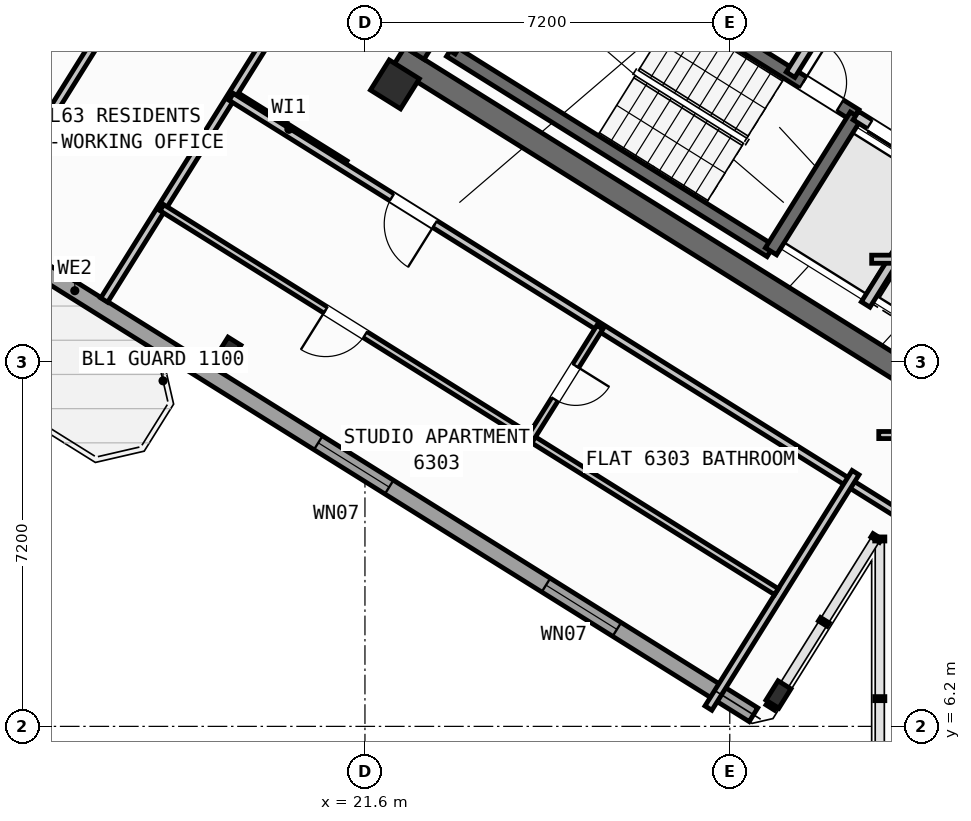
"""IFC4 building model, lengths in metres.
Left out: names, types, materials, properties, quantities, classifications, styles, units other than length and angle.
Written with IfcOpenShell. Run it as: python <this file> out.ifc"""

import sys

from ifc_helpers import new_model, si_unit, direction, frame, frame_2d, origin, origin_2d, place, context, subcontext, project, spatial, rectangle, hollow_rectangle, i_section, extrude, source, transform, mapped, element, fill, save


model = new_model("IFC4")
c1 = context("Model", 3, precision=1e-05, world=origin(), true_north=direction((0.0, 1.0)))
c2 = subcontext(c1, "Body", "Model", "MODEL_VIEW")
j1 = project(units=[si_unit("LENGTHUNIT", "METRE"), si_unit("PLANEANGLEUNIT", "RADIAN")], contexts=[c1])
p1 = place(None, origin())
s1 = spatial("IfcSite", under=j1, at=p1, CompositionType="ELEMENT")
p2 = place(p1, origin())
s2 = spatial("IfcBuilding", under=s1, at=p2, CompositionType="ELEMENT")
p3 = place(p2, frame((0.0, 0.0, 251.1)))
s3 = spatial("IfcBuildingStorey", under=s2, at=p3, CompositionType="ELEMENT", Elevation=251.1)
p4 = place(p3, frame((33.324, 12.503, 0.0), z_axis=(0.0, 0.0, 1.0), x_axis=(-0.848043529849, 0.529926571782, 0.0)))
e1 = element("IfcWall", 1, at=p4, inside=s3, PredefinedType="SHEAR", context=c2, shape_type="SweptSolid", body=[
    extrude(rectangle(XDim=13.04, YDim=0.45, at=frame_2d((6.52, 0.0))), origin(), (0.0, 0.0, 1.0), 3.32),
])
p5 = place(p3, frame((26.007, 24.976, 0.0), z_axis=(0.0, 0.0, 1.0), x_axis=(-0.529931155655, -0.848040665456, 0.0)))
e2 = element("IfcWall", 2, at=p5, inside=s3, PredefinedType="SHEAR", context=c2, shape_type="SweptSolid", body=[
    extrude(rectangle(XDim=6.475, YDim=0.45, at=frame_2d((3.238, 0.0))), origin(), (0.0, 0.0, 1.0), 3.32),
])
m1 = source(origin(), c2, "Body", "SweptSolid", [
    extrude(i_section(OverallWidth=0.3, OverallDepth=0.45, WebThickness=0.014, FlangeThickness=0.026, at=origin_2d()), origin(), (0.0, 0.0, 1.0), 3.6),
])
p6 = place(p3, frame((29.761, 6.829, 0.0), z_axis=(0.0, 0.0, 1.0), x_axis=(-0.848048096156, 0.529919264233, 0.0)))
e3 = element("IfcColumn", 3, at=p6, inside=s3, PredefinedType="COLUMN", context=c2, shape_type="MappedRepresentation", body=[
    mapped(m1, transform((0.0, 0.0, 0.0), scale=1.0)),
])
m2 = source(origin(), c2, "Body", "SweptSolid", [
    extrude(hollow_rectangle(XDim=0.7, YDim=0.7, WallThickness=0.028, at=origin_2d()), origin(), (0.0, 0.0, 1.0), 3.6),
])
p7 = place(p3, frame((22.191, 18.87, 0.0), z_axis=(0.0, 0.0, 1.0), x_axis=(-0.848048096156, 0.529919264233, 0.0)))
e4 = element("IfcColumn", 4, at=p7, inside=s3, PredefinedType="COLUMN", context=c2, shape_type="MappedRepresentation", body=[
    mapped(m2, transform((0.0, 0.0, 0.0), scale=1.0)),
])
p8 = place(p3, frame((18.906, 13.612, 0.0), z_axis=(0.0, 0.0, 1.0), x_axis=(-0.848048096156, 0.529919264233, 0.0)))
e5 = element("IfcColumn", 5, at=p8, inside=s3, PredefinedType="COLUMN", context=c2, shape_type="MappedRepresentation", body=[
    mapped(m1, transform((0.0, 0.0, 0.0), scale=1.0)),
])
p9 = place(p3, frame((29.268, 6.429, 0.0), z_axis=(0.0, 0.0, 1.0), x_axis=(-0.848049971435, 0.529916263149, 0.0)))
e6 = element("IfcWall", 6, at=p9, inside=s3, PredefinedType="STANDARD", context=c2, shape_type="SweptSolid", body=[
    extrude(rectangle(XDim=31.588, YDim=0.32, at=frame_2d((15.794, 0.0))), origin(), (0.0, 0.0, 1.0), 3.32),
])
p10 = place(p9, frame((22.848, 0.0, 0.0)))
e7 = element("IfcOpeningElement", 7, at=p10, cuts=e6, PredefinedType="OPENING", context=c2, shape_type="SweptSolid", body=[
    extrude(rectangle(XDim=1.2, YDim=2.15, at=frame_2d((0.6, 1.075))), frame((0.0, 0.17, 0.0), z_axis=(0.0, -1.0, 0.0), x_axis=(1.0, 0.0, 0.0)), (0.0, 0.0, 1.0), 0.34),
])
p11 = place(p9, frame((3.178, 0.0, 0.9)))
e8 = element("IfcOpeningElement", 8, at=p11, cuts=e6, PredefinedType="OPENING", context=c2, shape_type="SweptSolid", body=[
    extrude(rectangle(XDim=1.65, YDim=1.45, at=frame_2d((0.825, 0.725))), frame((0.0, 0.17, 0.0), z_axis=(0.0, -1.0, 0.0), x_axis=(1.0, 0.0, 0.0)), (0.0, 0.0, 1.0), 0.34),
])
p12 = place(p9, frame((8.478, 0.0, 0.9)))
e9 = element("IfcOpeningElement", 9, at=p12, cuts=e6, PredefinedType="OPENING", context=c2, shape_type="SweptSolid", body=[
    extrude(rectangle(XDim=1.65, YDim=1.45, at=frame_2d((0.825, 0.725))), frame((0.0, 0.17, 0.0), z_axis=(0.0, -1.0, 0.0), x_axis=(1.0, 0.0, 0.0)), (0.0, 0.0, 1.0), 0.34),
])
p13 = place(p3, frame((29.605, 15.581, 0.0), z_axis=(0.0, 0.0, 1.0), x_axis=(-0.848036911448, 0.529937163087, 0.0)))
e10 = element("IfcWall", 10, at=p13, inside=s3, PredefinedType="SHEAR", context=c2, shape_type="SweptSolid", body=[
    extrude(rectangle(XDim=7.46, YDim=0.26, at=frame_2d((3.73, 0.0))), origin(), (0.0, 0.0, 1.0), 3.32),
])
p14 = place(p3, frame((31.28, 18.261, 0.0), z_axis=(0.0, 0.0, 1.0), x_axis=(-0.848051618787, 0.529913626805, 0.0)))
e11 = element("IfcWall", 11, at=p14, inside=s3, PredefinedType="SHEAR", context=c2, shape_type="SweptSolid", body=[
    extrude(rectangle(XDim=7.46, YDim=0.26, at=frame_2d((3.73, 0.0))), origin(), (0.0, 0.0, 1.0), 3.32),
])
p15 = place(p14, frame((0.36, 0.0, 0.0)))
e12 = element("IfcOpeningElement", 12, at=p15, cuts=e11, PredefinedType="OPENING", context=c2, shape_type="SweptSolid", body=[
    extrude(rectangle(XDim=0.86, YDim=2.05, at=frame_2d((0.43, 1.025))), frame((0.0, 0.14, 0.0), z_axis=(0.0, -1.0, 0.0), x_axis=(1.0, 0.0, 0.0)), (0.0, 0.0, 1.0), 0.28),
])
p16 = place(p3, frame((31.288, 18.256, 0.0), z_axis=(0.0, 0.0, 1.0), x_axis=(-0.529943379326, -0.848033026897, 0.0)))
e13 = element("IfcWall", 13, at=p16, inside=s3, PredefinedType="SHEAR", context=c2, shape_type="SweptSolid", body=[
    extrude(rectangle(XDim=3.16, YDim=0.26, at=frame_2d((1.58, 0.0))), origin(), (0.0, 0.0, 1.0), 3.32),
])
p17 = place(p3, frame((24.945, 22.22, 0.0), z_axis=(0.0, 0.0, 1.0), x_axis=(-0.529908658664, -0.84805472316, 0.0)))
e14 = element("IfcWall", 14, at=p17, inside=s3, PredefinedType="SHEAR", context=c2, shape_type="SweptSolid", body=[
    extrude(rectangle(XDim=3.16, YDim=0.26, at=frame_2d((1.58, 0.0))), origin(), (0.0, 0.0, 1.0), 3.32),
])
p18 = place(p3, frame((34.933, 15.978, 0.0), z_axis=(0.0, 0.0, 1.0), x_axis=(-0.848055739377, 0.529907032327, 0.0)))
e15 = element("IfcWall", 15, at=p18, inside=s3, PredefinedType="STANDARD", context=c2, shape_type="SweptSolid", body=[
    extrude(rectangle(XDim=4.298, YDim=0.2, at=frame_2d((2.149, 0.0))), origin(), (0.0, 0.0, 1.0), 3.31),
])
p19 = place(p18, frame((0.448, 0.0, 0.0)))
e16 = element("IfcOpeningElement", 16, at=p19, cuts=e15, PredefinedType="OPENING", context=c2, shape_type="SweptSolid", body=[
    extrude(rectangle(XDim=1.3, YDim=2.2, at=frame_2d((0.65, 1.1))), frame((0.0, 0.11, 0.0), z_axis=(0.0, -1.0, 0.0), x_axis=(1.0, 0.0, 0.0)), (0.0, 0.0, 1.0), 0.22),
])
p20 = place(p18, frame((2.523, 0.0, 0.0)))
e17 = element("IfcOpeningElement", 17, at=p20, cuts=e15, PredefinedType="OPENING", context=c2, shape_type="SweptSolid", body=[
    extrude(rectangle(XDim=1.45, YDim=2.25, at=frame_2d((0.725, 1.125))), frame((0.0, 0.11, 0.0), z_axis=(0.0, -1.0, 0.0), x_axis=(1.0, 0.0, 0.0)), (0.0, 0.0, 1.0), 0.22),
])
p21 = place(p3, frame((36.459, 18.421, 0.0), z_axis=(0.0, 0.0, 1.0), x_axis=(-0.848059591691, 0.529900867089, 0.0)))
e18 = element("IfcWall", 18, at=p21, inside=s3, PredefinedType="STANDARD", context=c2, shape_type="SweptSolid", body=[
    extrude(rectangle(XDim=5.818, YDim=0.2, at=frame_2d((2.909, 0.0))), origin(), (0.0, 0.0, 1.0), 3.31),
])
p22 = place(p21, frame((2.598, 0.0, 0.0)))
e19 = element("IfcOpeningElement", 19, at=p22, cuts=e18, PredefinedType="OPENING", context=c2, shape_type="SweptSolid", body=[
    extrude(rectangle(XDim=1.15, YDim=2.1, at=frame_2d((0.575, 1.05))), frame((0.0, 0.11, 0.0), z_axis=(0.0, -1.0, 0.0), x_axis=(1.0, 0.0, 0.0)), (0.0, 0.0, 1.0), 0.22),
])
p23 = place(p3, frame((33.029, 17.003, 0.0), z_axis=(0.0, 0.0, 1.0), x_axis=(-0.529916267533, -0.848049968695, 0.0)))
e20 = element("IfcWall", 20, at=p23, inside=s3, PredefinedType="STANDARD", context=c2, shape_type="SweptSolid", body=[
    extrude(rectangle(XDim=2.92, YDim=0.2, at=frame_2d((1.46, 0.0))), origin(), (0.0, 0.0, 1.0), 3.31),
])
p24 = place(p3, frame((31.525, 21.504, 0.0), z_axis=(0.0, 0.0, 1.0), x_axis=(-0.529907497854, -0.848055448493, 0.0)))
e21 = element("IfcWall", 21, at=p24, inside=s3, PredefinedType="STANDARD", context=c2, shape_type="SweptSolid", body=[
    extrude(rectangle(XDim=2.88, YDim=0.2, at=frame_2d((1.44, 0.0))), origin(), (0.0, 0.0, 1.0), 3.31),
])
p25 = place(p3, frame((21.206, 17.292, 0.0), z_axis=(0.0, 0.0, 1.0), x_axis=(-0.848050851465, 0.529914854792, 0.0)))
e22 = element("IfcWall", 22, at=p25, inside=s3, PredefinedType="PARTITIONING", context=c2, shape_type="SweptSolid", body=[
    extrude(rectangle(XDim=2.61, YDim=0.16, at=frame_2d((1.305, 0.0))), origin(), (0.0, 0.0, 1.0), 3.31),
])
p26 = place(p3, frame((21.938, 23.391, 0.0), z_axis=(0.0, 0.0, 1.0), x_axis=(-0.529924725692, -0.848044683434, 0.0)))
e23 = element("IfcWall", 23, at=p26, inside=s3, PredefinedType="PARTITIONING", context=c2, shape_type="SweptSolid", body=[
    extrude(rectangle(XDim=10.35, YDim=0.16, at=frame_2d((5.175, 0.0))), origin(), (0.0, 0.0, 1.0), 3.31),
])
p27 = place(p3, frame((19.529, 24.896, 0.0), z_axis=(0.0, 0.0, 1.0), x_axis=(-0.529914125013, -0.848051307476, 0.0)))
e24 = element("IfcWall", 24, at=p27, inside=s3, PredefinedType="PARTITIONING", context=c2, shape_type="SweptSolid", body=[
    extrude(rectangle(XDim=10.35, YDim=0.16, at=frame_2d((5.175, 0.0))), origin(), (0.0, 0.0, 1.0), 3.31),
])
p28 = place(p3, frame((16.837, 26.579, 0.0), z_axis=(0.0, 0.0, 1.0), x_axis=(-0.529941690036, -0.848034082547, 0.0)))
e25 = element("IfcWall", 25, at=p28, inside=s3, PredefinedType="PARTITIONING", context=c2, shape_type="SweptSolid", body=[
    extrude(rectangle(XDim=10.35, YDim=0.16, at=frame_2d((5.175, 0.0))), origin(), (0.0, 0.0, 1.0), 2.935),
])
p29 = place(p3, frame((32.164, 10.374, 0.0), z_axis=(0.0, 0.0, 1.0), x_axis=(-0.848044107957, 0.529925646633, 0.0)))
e26 = element("IfcWall", 26, at=p29, inside=s3, PredefinedType="PARTITIONING", context=c2, shape_type="SweptSolid", body=[
    extrude(rectangle(XDim=15.57, YDim=0.16, at=frame_2d((7.785, 0.0))), origin(), (0.0, 0.0, 1.0), 3.31),
])
p30 = place(p29, frame((10.83, 0.0, 0.0)))
e27 = element("IfcOpeningElement", 27, at=p30, cuts=e26, PredefinedType="OPENING", context=c2, shape_type="SweptSolid", body=[
    extrude(rectangle(XDim=1.0, YDim=2.1, at=frame_2d((0.5, 1.05))), frame((0.0, 0.09, 0.0), z_axis=(0.0, -1.0, 0.0), x_axis=(1.0, 0.0, 0.0)), (0.0, 0.0, 1.0), 0.18),
])
p31 = place(p3, frame((31.282, 11.208, 0.0), z_axis=(0.0, 0.0, 1.0), x_axis=(-0.529938869374, -0.84803584519, 0.0)))
e28 = element("IfcWall", 28, at=p31, inside=s3, PredefinedType="PARTITIONING", context=c2, shape_type="SweptSolid", body=[
    extrude(rectangle(XDim=5.48, YDim=0.16, at=frame_2d((2.74, 0.0))), origin(), (0.0, 0.0, 1.0), 3.31),
])
p32 = place(p3, frame((29.72, 8.859, 0.0), z_axis=(0.0, 0.0, 1.0), x_axis=(-0.848049134363, 0.529917602752, 0.0)))
e29 = element("IfcWall", 29, at=p32, inside=s3, PredefinedType="PLUMBINGWALL", context=c2, shape_type="SweptSolid", body=[
    extrude(rectangle(XDim=14.3, YDim=0.14, at=frame_2d((7.15, 0.0))), origin(), (0.0, 0.0, 1.0), 3.31),
])
p33 = place(p32, frame((9.57, 0.0, 0.0)))
e30 = element("IfcOpeningElement", 30, at=p33, cuts=e29, PredefinedType="OPENING", context=c2, shape_type="SweptSolid", body=[
    extrude(rectangle(XDim=0.92, YDim=2.08, at=frame_2d((0.46, 1.04))), frame((0.0, 0.08, 0.0), z_axis=(0.0, -1.0, 0.0), x_axis=(1.0, 0.0, 0.0)), (0.0, 0.0, 1.0), 0.16),
])
p34 = place(p3, frame((26.237, 14.078, 0.0), z_axis=(0.0, 0.0, 1.0), x_axis=(-0.52995640672, -0.848024885824, 0.0)))
e31 = element("IfcWall", 31, at=p34, inside=s3, PredefinedType="PLUMBINGWALL", context=c2, shape_type="SweptSolid", body=[
    extrude(rectangle(XDim=2.58, YDim=0.14, at=frame_2d((1.29, 0.0))), origin(), (0.0, 0.0, 1.0), 3.31),
])
p35 = place(p34, frame((0.9, 0.0, 0.0)))
e32 = element("IfcOpeningElement", 32, at=p35, cuts=e31, PredefinedType="OPENING", context=c2, shape_type="SweptSolid", body=[
    extrude(rectangle(XDim=0.78, YDim=2.05, at=frame_2d((0.39, 1.025))), frame((0.0, 0.08, 0.0), z_axis=(0.0, -1.0, 0.0), x_axis=(1.0, 0.0, 0.0)), (0.0, 0.0, 1.0), 0.16),
])
p36 = place(p3, frame((31.6, 15.42, 0.0), z_axis=(0.0, 0.0, 1.0), x_axis=(1.0, 0.0, 0.0)))
e33 = element("IfcWall", 33, at=p36, inside=s3, PredefinedType="PARTITIONING", context=c2, shape_type="SweptSolid", body=[
    extrude(rectangle(XDim=2.984, YDim=0.16, at=frame_2d((1.492, 0.0))), origin(), (0.0, 0.0, 1.0), 3.31),
])
p37 = place(p3, frame((31.74, 11.95, 0.0), z_axis=(0.0, 0.0, 1.0), x_axis=(1.0, 0.0, 0.0)))
e34 = element("IfcWall", 34, at=p37, inside=s3, PredefinedType="PLUMBINGWALL", context=c2, shape_type="SweptSolid", body=[
    extrude(rectangle(XDim=0.842, YDim=0.14, at=frame_2d((0.421, 0.0))), origin(), (0.0, 0.0, 1.0), 3.31),
])
m3 = source(origin(), c2, "Body", "SweptSolid", [
    extrude(rectangle(XDim=1.65, YDim=1.45, at=frame_2d((0.825, 0.725))), frame((0.0, 0.03, 0.0), z_axis=(0.0, -1.0, 0.0), x_axis=(1.0, 0.0, 0.0)), (0.0, 0.0, 1.0), 0.06),
])
p38 = place(p11, origin())
e35 = element("IfcWindow", 35, at=p38, inside=s3, PartitioningType="SINGLE_PANEL", PredefinedType="WINDOW", context=c2, shape_type="MappedRepresentation", body=[
    mapped(m3, transform((0.0, 0.0, 0.0), scale=1.0)),
])
fill(e8, e35)
p39 = place(p12, origin())
e36 = element("IfcWindow", 36, at=p39, inside=s3, PartitioningType="SINGLE_PANEL", PredefinedType="WINDOW", context=c2, shape_type="MappedRepresentation", body=[
    mapped(m3, transform((0.0, 0.0, 0.0), scale=1.0)),
])
fill(e9, e36)
m4 = source(origin(), c2, "Body", "SweptSolid", [
    extrude(rectangle(XDim=0.86, YDim=2.05, at=frame_2d((0.43, 1.025))), frame((0.0, 0.025, 0.0), z_axis=(0.0, -1.0, 0.0), x_axis=(1.0, 0.0, 0.0)), (0.0, 0.0, 1.0), 0.05),
])
p40 = place(p15, frame((0.86, 0.0, 0.0), z_axis=(0.0, 0.0, 1.0), x_axis=(-1.0, 0.0, 0.0)))
e37 = element("IfcDoor", 37, at=p40, inside=s3, OperationType="SINGLE_SWING_LEFT", PredefinedType="DOOR", context=c2, shape_type="MappedRepresentation", body=[
    mapped(m4, transform((0.0, 0.0, 0.0), scale=1.0)),
])
fill(e12, e37)
m5 = source(origin(), c2, "Body", "SweptSolid", [
    extrude(rectangle(XDim=1.45, YDim=2.25, at=frame_2d((0.725, 1.125))), frame((0.0, 0.025, 0.0), z_axis=(0.0, -1.0, 0.0), x_axis=(1.0, 0.0, 0.0)), (0.0, 0.0, 1.0), 0.05),
])
p41 = place(p20, origin())
e38 = element("IfcDoor", 38, at=p41, inside=s3, OperationType="DOUBLE_DOOR_SLIDING", PredefinedType="DOOR", context=c2, shape_type="MappedRepresentation", body=[
    mapped(m5, transform((0.0, 0.0, 0.0), scale=1.0)),
])
fill(e17, e38)
m6 = source(origin(), c2, "Body", "SweptSolid", [
    extrude(rectangle(XDim=1.0, YDim=2.1, at=frame_2d((0.5, 1.05))), frame((0.0, 0.025, 0.0), z_axis=(0.0, -1.0, 0.0), x_axis=(1.0, 0.0, 0.0)), (0.0, 0.0, 1.0), 0.05),
])
p42 = place(p30, origin())
e39 = element("IfcDoor", 39, at=p42, inside=s3, OperationType="SINGLE_SWING_LEFT", PredefinedType="DOOR", context=c2, shape_type="MappedRepresentation", body=[
    mapped(m6, transform((0.0, 0.0, 0.0), scale=1.0)),
])
fill(e27, e39)
m7 = source(origin(), c2, "Body", "SweptSolid", [
    extrude(rectangle(XDim=0.92, YDim=2.08, at=frame_2d((0.46, 1.04))), frame((0.0, 0.025, 0.0), z_axis=(0.0, -1.0, 0.0), x_axis=(1.0, 0.0, 0.0)), (0.0, 0.0, 1.0), 0.05),
])
p43 = place(p33, origin())
e40 = element("IfcDoor", 40, at=p43, inside=s3, OperationType="SINGLE_SWING_RIGHT", PredefinedType="DOOR", context=c2, shape_type="MappedRepresentation", body=[
    mapped(m7, transform((0.0, 0.0, 0.0), scale=1.0)),
])
fill(e30, e40)
m8 = source(origin(), c2, "Body", "SweptSolid", [
    extrude(rectangle(XDim=0.78, YDim=2.05, at=frame_2d((0.39, 1.025))), frame((0.0, 0.025, 0.0), z_axis=(0.0, -1.0, 0.0), x_axis=(1.0, 0.0, 0.0)), (0.0, 0.0, 1.0), 0.05),
])
p44 = place(p35, origin())
e41 = element("IfcDoor", 41, at=p44, inside=s3, OperationType="SINGLE_SWING_LEFT", PredefinedType="DOOR", context=c2, shape_type="MappedRepresentation", body=[
    mapped(m8, transform((0.0, 0.0, 0.0), scale=1.0)),
])
fill(e32, e41)
save(model, sys.argv[1])
